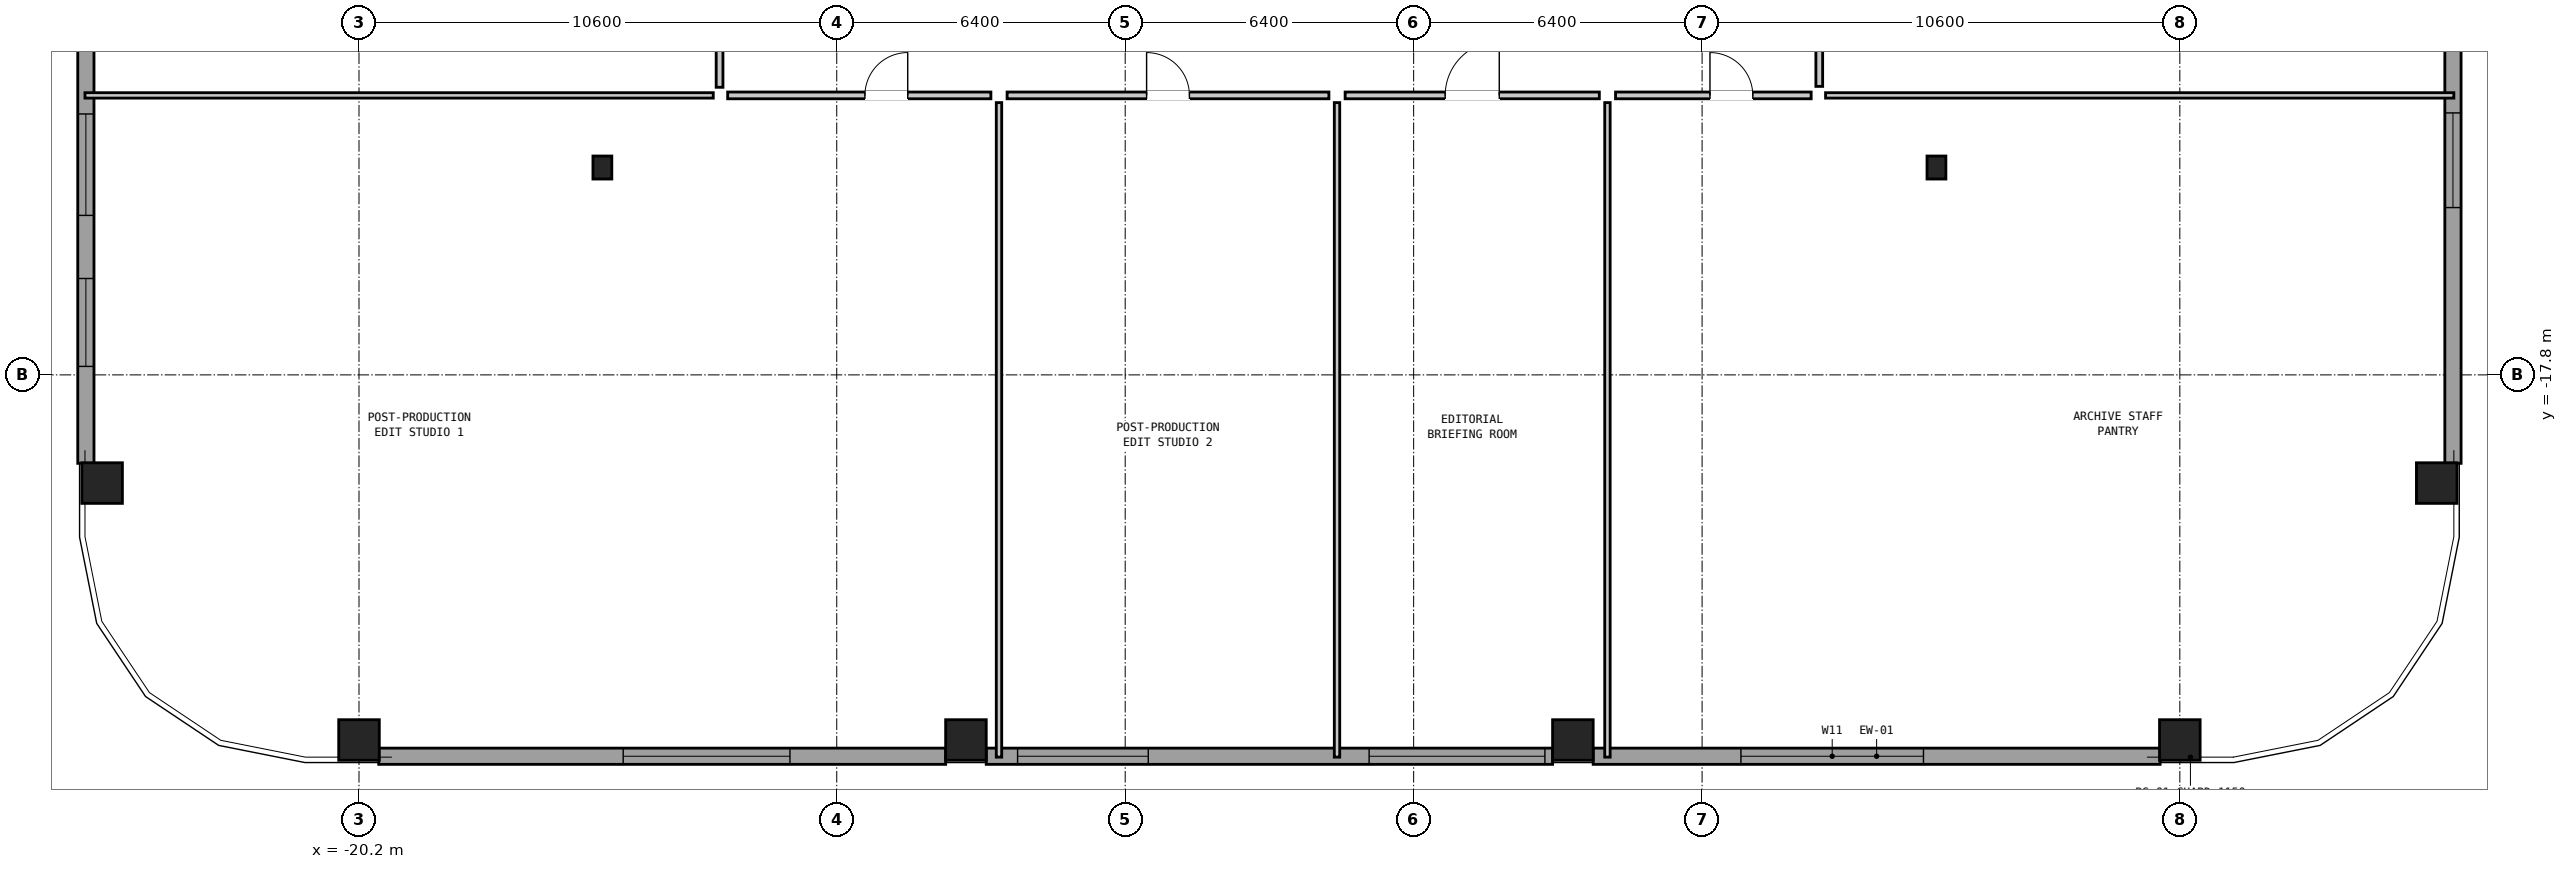
"""IFC4 building model, lengths in metres.
Left out: names, types, materials, properties, quantities, classifications, styles, units other than length and angle.
Written with IfcOpenShell. Run it as: python <this file> out.ifc"""

import sys

from ifc_helpers import new_model, si_unit, direction, frame, frame_2d, origin, origin_2d, place, context, subcontext, project, spatial, rectangle, hollow_rectangle, i_section, extrude, element, fill, save


model = new_model("IFC4")
c1 = context("Model", 3, precision=1e-05, world=origin(), true_north=direction((0.0, 1.0)))
c2 = subcontext(c1, "Body", "Model", "MODEL_VIEW")
j1 = project(units=[si_unit("LENGTHUNIT", "METRE"), si_unit("PLANEANGLEUNIT", "RADIAN")], contexts=[c1])
p1 = place(None, origin())
s1 = spatial("IfcSite", under=j1, at=p1, CompositionType="ELEMENT")
p2 = place(p1, origin())
s2 = spatial("IfcBuilding", under=s1, at=p2, CompositionType="ELEMENT")
p3 = place(p2, frame((0.0, 0.0, 44.4)))
s3 = spatial("IfcBuildingStorey", under=s2, at=p3, CompositionType="ELEMENT", Elevation=44.4)
for number, where, z_axis, x_axis in (
    (1, (-20.2, -25.9, 0.0), (0.0, 0.0, 1.0), (1.0, 0.0, 0.0)),
    (2, (-6.733, -25.9, 0.0), (0.0, 0.0, 1.0), (1.0, 0.0, 0.0)),
    (3, (6.733, -25.9, 0.0), (0.0, 0.0, 1.0), (1.0, 0.0, 0.0)),
    (4, (20.2, -25.9, 0.0), (0.0, 0.0, 1.0), (1.0, 0.0, 0.0)),
    (5, (25.9, -20.2, 0.0), (0.0, 0.0, 1.0), (0.0, 1.0, 0.0)),
    (6, (-25.9, -20.2, 0.0), (0.0, 0.0, 1.0), (0.0, 1.0, 0.0)),
):
    element("IfcColumn", number, at=place(p3, frame(where, z_axis=z_axis, x_axis=x_axis)), inside=s3, PredefinedType="COLUMN", context=c2, shape_type="SweptSolid", body=[
        extrude(hollow_rectangle(XDim=0.9, YDim=0.9, WallThickness=0.055, at=origin_2d()), origin(), (0.0, 0.0, 1.0), 3.05),
    ])
for number, where, z_axis, x_axis in (
    (7, (-14.8, -13.2, 0.0), (0.0, 0.0, 1.0), (1.0, 0.0, 0.0)),
    (8, (14.8, -13.2, 0.0), (0.0, 0.0, 1.0), (1.0, 0.0, 0.0)),
):
    element("IfcColumn", number, at=place(p3, frame(where, z_axis=z_axis, x_axis=x_axis)), inside=s3, PredefinedType="COLUMN", context=c2, shape_type="SweptSolid", body=[
        extrude(i_section(OverallWidth=0.418, OverallDepth=0.51, WebThickness=0.042, FlangeThickness=0.068, at=origin_2d()), origin(), (0.0, 0.0, 1.0), 3.05),
    ])
p4 = place(p3, frame((19.762, -26.26, 0.0), z_axis=(0.0, 0.0, 1.0), x_axis=(-1.0, 0.0, 0.0)))
e9 = element("IfcWall", 9, at=p4, inside=s3, PredefinedType="SOLIDWALL", context=c2, shape_type="SweptSolid", body=[
    extrude(rectangle(XDim=12.579, YDim=0.36, at=frame_2d((6.289, 0.0))), origin(), (0.0, 0.0, 1.0), 2.067),
])
p5 = place(p4, frame((5.25, 0.0, 0.2)))
e10 = element("IfcOpeningElement", 10, at=p5, cuts=e9, PredefinedType="OPENING", context=c2, shape_type="SweptSolid", body=[
    extrude(rectangle(XDim=4.05, YDim=1.0, at=frame_2d((2.025, 0.5))), frame((0.0, 0.192, 0.0), z_axis=(0.0, -1.0, 0.0), x_axis=(1.0, 0.0, 0.0)), (0.0, 0.0, 1.0), 0.384),
])
p6 = place(p3, frame((6.283, -26.26, 0.0), z_axis=(0.0, 0.0, 1.0), x_axis=(-1.0, 0.0, 0.0)))
e11 = element("IfcWall", 11, at=p6, inside=s3, PredefinedType="SOLIDWALL", context=c2, shape_type="SweptSolid", body=[
    extrude(rectangle(XDim=12.566, YDim=0.36, at=frame_2d((6.283, 0.0))), origin(), (0.0, 0.0, 1.0), 2.067),
])
p7 = place(p6, frame((0.171, 0.0, 0.2)))
e12 = element("IfcOpeningElement", 12, at=p7, cuts=e11, PredefinedType="OPENING", context=c2, shape_type="SweptSolid", body=[
    extrude(rectangle(XDim=3.9, YDim=1.05, at=frame_2d((1.95, 0.525))), frame((0.0, 0.192, 0.0), z_axis=(0.0, -1.0, 0.0), x_axis=(1.0, 0.0, 0.0)), (0.0, 0.0, 1.0), 0.384),
])
p8 = place(p6, frame((8.971, 0.0, 0.2)))
e13 = element("IfcOpeningElement", 13, at=p8, cuts=e11, PredefinedType="OPENING", context=c2, shape_type="SweptSolid", body=[
    extrude(rectangle(XDim=2.9, YDim=1.3, at=frame_2d((1.45, 0.65))), frame((0.0, 0.192, 0.0), z_axis=(0.0, -1.0, 0.0), x_axis=(1.0, 0.0, 0.0)), (0.0, 0.0, 1.0), 0.384),
])
p9 = place(p3, frame((-7.183, -26.26, 0.0), z_axis=(0.0, 0.0, 1.0), x_axis=(-1.0, 0.0, 0.0)))
e14 = element("IfcWall", 14, at=p9, inside=s3, PredefinedType="SOLIDWALL", context=c2, shape_type="SweptSolid", body=[
    extrude(rectangle(XDim=12.579, YDim=0.36, at=frame_2d((6.289, 0.0))), origin(), (0.0, 0.0, 1.0), 2.067),
])
p10 = place(p9, frame((3.455, 0.0, 0.2)))
e15 = element("IfcOpeningElement", 15, at=p10, cuts=e14, PredefinedType="OPENING", context=c2, shape_type="SweptSolid", body=[
    extrude(rectangle(XDim=3.7, YDim=1.1, at=frame_2d((1.85, 0.55))), frame((0.0, 0.192, 0.0), z_axis=(0.0, -1.0, 0.0), x_axis=(1.0, 0.0, 0.0)), (0.0, 0.0, 1.0), 0.384),
])
p11 = place(p3, frame((26.26, -7.183, 0.0), z_axis=(0.0, 0.0, 1.0), x_axis=(0.0, -1.0, 0.0)))
e16 = element("IfcWall", 16, at=p11, inside=s3, PredefinedType="SOLIDWALL", context=c2, shape_type="SweptSolid", body=[
    extrude(rectangle(XDim=12.579, YDim=0.36, at=frame_2d((6.289, 0.0))), origin(), (0.0, 0.0, 1.0), 2.067),
])
p12 = place(p11, frame((0.155, 0.0, 1.2)))
e17 = element("IfcOpeningElement", 17, at=p12, cuts=e16, PredefinedType="OPENING", context=c2, shape_type="SweptSolid", body=[
    extrude(rectangle(XDim=1.95, YDim=0.7, at=frame_2d((0.975, 0.35))), frame((0.0, 0.192, 0.0), z_axis=(0.0, -1.0, 0.0), x_axis=(1.0, 0.0, 0.0)), (0.0, 0.0, 1.0), 0.384),
])
p13 = place(p11, frame((4.805, 0.0, 0.2)))
e18 = element("IfcOpeningElement", 18, at=p13, cuts=e16, PredefinedType="OPENING", context=c2, shape_type="SweptSolid", body=[
    extrude(rectangle(XDim=2.1, YDim=1.3, at=frame_2d((1.05, 0.65))), frame((0.0, 0.192, 0.0), z_axis=(0.0, -1.0, 0.0), x_axis=(1.0, 0.0, 0.0)), (0.0, 0.0, 1.0), 0.384),
])
p14 = place(p3, frame((-26.26, -19.762, 0.0), z_axis=(0.0, 0.0, 1.0), x_axis=(0.0, 1.0, 0.0)))
e19 = element("IfcWall", 19, at=p14, inside=s3, PredefinedType="SOLIDWALL", context=c2, shape_type="SweptSolid", body=[
    extrude(rectangle(XDim=12.579, YDim=0.36, at=frame_2d((6.289, 0.0))), origin(), (0.0, 0.0, 1.0), 2.067),
])
p15 = place(p14, frame((2.15, 0.0, 1.2)))
e20 = element("IfcOpeningElement", 20, at=p15, cuts=e19, PredefinedType="OPENING", context=c2, shape_type="SweptSolid", body=[
    extrude(rectangle(XDim=1.95, YDim=0.7, at=frame_2d((0.975, 0.35))), frame((0.0, 0.192, 0.0), z_axis=(0.0, -1.0, 0.0), x_axis=(1.0, 0.0, 0.0)), (0.0, 0.0, 1.0), 0.384),
])
p16 = place(p14, frame((5.5, 0.0, 0.2)))
e21 = element("IfcOpeningElement", 21, at=p16, cuts=e19, PredefinedType="OPENING", context=c2, shape_type="SweptSolid", body=[
    extrude(rectangle(XDim=2.25, YDim=1.2, at=frame_2d((1.125, 0.6))), frame((0.0, 0.192, 0.0), z_axis=(0.0, -1.0, 0.0), x_axis=(1.0, 0.0, 0.0)), (0.0, 0.0, 1.0), 0.384),
])
for number, where, z_axis, x_axis in (
    (22, (-26.28, -11.6, 0.0), (0.0, 0.0, 1.0), (1.0, 0.0, 0.0)),
    (23, (12.34, -11.6, 0.0), (0.0, 0.0, 1.0), (1.0, 0.0, 0.0)),
):
    element("IfcWall", number, at=place(p3, frame(where, z_axis=z_axis, x_axis=x_axis)), inside=s3, PredefinedType="PARTITIONING", context=c2, shape_type="SweptSolid", body=[
        extrude(rectangle(XDim=13.94, YDim=0.12, at=frame_2d((6.97, 0.0))), origin(), (0.0, 0.0, 1.0), 2.274),
    ])
p17 = place(p3, frame((-6.0, -26.28, 0.0), z_axis=(0.0, 0.0, 1.0), x_axis=(0.0, 1.0, 0.0)))
e24 = element("IfcWall", 24, at=p17, inside=s3, PredefinedType="PARTITIONING", context=c2, shape_type="SweptSolid", body=[
    extrude(rectangle(XDim=14.52, YDim=0.12, at=frame_2d((7.26, 0.0))), origin(), (0.0, 0.0, 1.0), 2.274),
])
for number, where, z_axis, x_axis in (
    (25, (1.5, -26.28, 0.0), (0.0, 0.0, 1.0), (0.0, 1.0, 0.0)),
    (26, (7.5, -26.28, 0.0), (0.0, 0.0, 1.0), (0.0, 1.0, 0.0)),
):
    element("IfcWall", number, at=place(p3, frame(where, z_axis=z_axis, x_axis=x_axis)), inside=s3, PredefinedType="PARTITIONING", context=c2, shape_type="SweptSolid", body=[
        extrude(rectangle(XDim=14.52, YDim=0.12, at=frame_2d((7.26, 0.0))), origin(), (0.0, 0.0, 1.0), 2.83),
    ])
p18 = place(p3, frame((-12.02, -11.6, 0.0), z_axis=(0.0, 0.0, 1.0), x_axis=(1.0, 0.0, 0.0)))
e27 = element("IfcWall", 27, at=p18, inside=s3, PredefinedType="PARTITIONING", context=c2, shape_type="SweptSolid", body=[
    extrude(rectangle(XDim=5.84, YDim=0.15, at=frame_2d((2.92, 0.0))), origin(), (0.0, 0.0, 1.0), 2.274),
])
p19 = place(p18, frame((3.045, 0.0, 0.0)))
e28 = element("IfcOpeningElement", 28, at=p19, cuts=e27, PredefinedType="OPENING", context=c2, shape_type="SweptSolid", body=[
    extrude(rectangle(XDim=0.95, YDim=2.1, at=frame_2d((0.475, 1.05))), frame((0.0, 0.087, 0.0), z_axis=(0.0, -1.0, 0.0), x_axis=(1.0, 0.0, 0.0)), (0.0, 0.0, 1.0), 0.174),
])
p20 = place(p3, frame((-5.82, -11.6, 0.0), z_axis=(0.0, 0.0, 1.0), x_axis=(1.0, 0.0, 0.0)))
e29 = element("IfcWall", 29, at=p20, inside=s3, PredefinedType="PARTITIONING", context=c2, shape_type="SweptSolid", body=[
    extrude(rectangle(XDim=7.14, YDim=0.15, at=frame_2d((3.57, 0.0))), origin(), (0.0, 0.0, 1.0), 2.83),
])
p21 = place(p20, frame((3.095, 0.0, 0.0)))
e30 = element("IfcOpeningElement", 30, at=p21, cuts=e29, PredefinedType="OPENING", context=c2, shape_type="SweptSolid", body=[
    extrude(rectangle(XDim=0.95, YDim=2.1, at=frame_2d((0.475, 1.05))), frame((0.0, 0.087, 0.0), z_axis=(0.0, -1.0, 0.0), x_axis=(1.0, 0.0, 0.0)), (0.0, 0.0, 1.0), 0.174),
])
p22 = place(p3, frame((1.68, -11.6, 0.0), z_axis=(0.0, 0.0, 1.0), x_axis=(1.0, 0.0, 0.0)))
e31 = element("IfcWall", 31, at=p22, inside=s3, PredefinedType="PARTITIONING", context=c2, shape_type="SweptSolid", body=[
    extrude(rectangle(XDim=5.64, YDim=0.15, at=frame_2d((2.82, 0.0))), origin(), (0.0, 0.0, 1.0), 2.83),
])
p23 = place(p22, frame((2.22, 0.0, 0.0)))
e32 = element("IfcOpeningElement", 32, at=p23, cuts=e31, PredefinedType="OPENING", context=c2, shape_type="SweptSolid", body=[
    extrude(rectangle(XDim=1.2, YDim=2.1, at=frame_2d((0.6, 1.05))), frame((0.0, 0.087, 0.0), z_axis=(0.0, -1.0, 0.0), x_axis=(1.0, 0.0, 0.0)), (0.0, 0.0, 1.0), 0.174),
])
p24 = place(p3, frame((7.68, -11.6, 0.0), z_axis=(0.0, 0.0, 1.0), x_axis=(1.0, 0.0, 0.0)))
e33 = element("IfcWall", 33, at=p24, inside=s3, PredefinedType="PARTITIONING", context=c2, shape_type="SweptSolid", body=[
    extrude(rectangle(XDim=4.34, YDim=0.15, at=frame_2d((2.17, 0.0))), origin(), (0.0, 0.0, 1.0), 2.274),
])
p25 = place(p24, frame((2.095, 0.0, 0.0)))
e34 = element("IfcOpeningElement", 34, at=p25, cuts=e33, PredefinedType="OPENING", context=c2, shape_type="SweptSolid", body=[
    extrude(rectangle(XDim=0.95, YDim=2.1, at=frame_2d((0.475, 1.05))), frame((0.0, 0.087, 0.0), z_axis=(0.0, -1.0, 0.0), x_axis=(1.0, 0.0, 0.0)), (0.0, 0.0, 1.0), 0.174),
])
p26 = place(p3, frame((-12.2, -11.42, 0.0), z_axis=(0.0, 0.0, 1.0), x_axis=(0.0, 1.0, 0.0)))
e35 = element("IfcWall", 35, at=p26, inside=s3, PredefinedType="PARTITIONING", context=c2, shape_type="SweptSolid", body=[
    extrude(rectangle(XDim=8.24, YDim=0.15, at=frame_2d((4.12, 0.0))), origin(), (0.0, 0.0, 1.0), 2.83),
])
p27 = place(p26, frame((3.645, 0.0, 0.0)))
e36 = element("IfcOpeningElement", 36, at=p27, cuts=e35, PredefinedType="OPENING", context=c2, shape_type="SweptSolid", body=[
    extrude(rectangle(XDim=0.95, YDim=2.1, at=frame_2d((0.475, 1.05))), frame((0.0, 0.087, 0.0), z_axis=(0.0, -1.0, 0.0), x_axis=(1.0, 0.0, 0.0)), (0.0, 0.0, 1.0), 0.174),
])
p28 = place(p3, frame((12.2, -11.4, 0.0), z_axis=(0.0, 0.0, 1.0), x_axis=(0.0, 1.0, 0.0)))
e37 = element("IfcWall", 37, at=p28, inside=s3, PredefinedType="PARTITIONING", context=c2, shape_type="SweptSolid", body=[
    extrude(rectangle(XDim=8.84, YDim=0.15, at=frame_2d((4.42, 0.0))), origin(), (0.0, 0.0, 1.0), 2.83),
])
p29 = place(p28, frame((3.945, 0.0, 0.0)))
e38 = element("IfcOpeningElement", 38, at=p29, cuts=e37, PredefinedType="OPENING", context=c2, shape_type="SweptSolid", body=[
    extrude(rectangle(XDim=0.95, YDim=2.1, at=frame_2d((0.475, 1.05))), frame((0.0, 0.087, 0.0), z_axis=(0.0, -1.0, 0.0), x_axis=(1.0, 0.0, 0.0)), (0.0, 0.0, 1.0), 0.174),
])
p30 = place(p5, origin())
e39 = element("IfcWindow", 39, at=p30, inside=s3, PartitioningType="SINGLE_PANEL", PredefinedType="WINDOW", context=c2, shape_type="SweptSolid", body=[
    extrude(rectangle(XDim=4.05, YDim=1.0, at=frame_2d((2.025, 0.5))), frame((0.0, 0.03, 0.0), z_axis=(0.0, -1.0, 0.0), x_axis=(1.0, 0.0, 0.0)), (0.0, 0.0, 1.0), 0.06),
])
fill(e10, e39)
p31 = place(p7, origin())
e40 = element("IfcWindow", 40, at=p31, inside=s3, PartitioningType="SINGLE_PANEL", PredefinedType="WINDOW", context=c2, shape_type="SweptSolid", body=[
    extrude(rectangle(XDim=3.9, YDim=1.05, at=frame_2d((1.95, 0.525))), frame((0.0, 0.03, 0.0), z_axis=(0.0, -1.0, 0.0), x_axis=(1.0, 0.0, 0.0)), (0.0, 0.0, 1.0), 0.06),
])
fill(e12, e40)
p32 = place(p8, origin())
e41 = element("IfcWindow", 41, at=p32, inside=s3, PartitioningType="SINGLE_PANEL", PredefinedType="WINDOW", context=c2, shape_type="SweptSolid", body=[
    extrude(rectangle(XDim=2.9, YDim=1.3, at=frame_2d((1.45, 0.65))), frame((0.0, 0.03, 0.0), z_axis=(0.0, -1.0, 0.0), x_axis=(1.0, 0.0, 0.0)), (0.0, 0.0, 1.0), 0.06),
])
fill(e13, e41)
p33 = place(p10, origin())
e42 = element("IfcWindow", 42, at=p33, inside=s3, PartitioningType="SINGLE_PANEL", PredefinedType="WINDOW", context=c2, shape_type="SweptSolid", body=[
    extrude(rectangle(XDim=3.7, YDim=1.1, at=frame_2d((1.85, 0.55))), frame((0.0, 0.03, 0.0), z_axis=(0.0, -1.0, 0.0), x_axis=(1.0, 0.0, 0.0)), (0.0, 0.0, 1.0), 0.06),
])
fill(e15, e42)
p34 = place(p13, origin())
e43 = element("IfcWindow", 43, at=p34, inside=s3, PartitioningType="SINGLE_PANEL", PredefinedType="WINDOW", context=c2, shape_type="SweptSolid", body=[
    extrude(rectangle(XDim=2.1, YDim=1.3, at=frame_2d((1.05, 0.65))), frame((0.0, 0.03, 0.0), z_axis=(0.0, -1.0, 0.0), x_axis=(1.0, 0.0, 0.0)), (0.0, 0.0, 1.0), 0.06),
])
fill(e18, e43)
p35 = place(p15, origin())
e44 = element("IfcWindow", 44, at=p35, inside=s3, PartitioningType="SINGLE_PANEL", PredefinedType="WINDOW", context=c2, shape_type="SweptSolid", body=[
    extrude(rectangle(XDim=1.95, YDim=0.7, at=frame_2d((0.975, 0.35))), frame((0.0, 0.03, 0.0), z_axis=(0.0, -1.0, 0.0), x_axis=(1.0, 0.0, 0.0)), (0.0, 0.0, 1.0), 0.06),
])
fill(e20, e44)
p36 = place(p16, origin())
e45 = element("IfcWindow", 45, at=p36, inside=s3, PartitioningType="SINGLE_PANEL", PredefinedType="WINDOW", context=c2, shape_type="SweptSolid", body=[
    extrude(rectangle(XDim=2.25, YDim=1.2, at=frame_2d((1.125, 0.6))), frame((0.0, 0.03, 0.0), z_axis=(0.0, -1.0, 0.0), x_axis=(1.0, 0.0, 0.0)), (0.0, 0.0, 1.0), 0.06),
])
fill(e21, e45)
p37 = place(p19, origin())
e46 = element("IfcDoor", 46, at=p37, inside=s3, OperationType="SINGLE_SWING_RIGHT", PredefinedType="DOOR", context=c2, shape_type="SweptSolid", body=[
    extrude(rectangle(XDim=0.95, YDim=2.1, at=frame_2d((0.475, 1.05))), frame((0.0, 0.025, 0.0), z_axis=(0.0, -1.0, 0.0), x_axis=(1.0, 0.0, 0.0)), (0.0, 0.0, 1.0), 0.05),
])
fill(e28, e46)
p38 = place(p21, origin())
e47 = element("IfcDoor", 47, at=p38, inside=s3, OperationType="SINGLE_SWING_LEFT", PredefinedType="DOOR", context=c2, shape_type="SweptSolid", body=[
    extrude(rectangle(XDim=0.95, YDim=2.1, at=frame_2d((0.475, 1.05))), frame((0.0, 0.025, 0.0), z_axis=(0.0, -1.0, 0.0), x_axis=(1.0, 0.0, 0.0)), (0.0, 0.0, 1.0), 0.05),
])
fill(e30, e47)
p39 = place(p23, origin())
e48 = element("IfcDoor", 48, at=p39, inside=s3, OperationType="SINGLE_SWING_RIGHT", PredefinedType="DOOR", context=c2, shape_type="SweptSolid", body=[
    extrude(rectangle(XDim=1.2, YDim=2.1, at=frame_2d((0.6, 1.05))), frame((0.0, 0.025, 0.0), z_axis=(0.0, -1.0, 0.0), x_axis=(1.0, 0.0, 0.0)), (0.0, 0.0, 1.0), 0.05),
])
fill(e32, e48)
p40 = place(p25, origin())
e49 = element("IfcDoor", 49, at=p40, inside=s3, OperationType="SINGLE_SWING_LEFT", PredefinedType="DOOR", context=c2, shape_type="SweptSolid", body=[
    extrude(rectangle(XDim=0.95, YDim=2.1, at=frame_2d((0.475, 1.05))), frame((0.0, 0.025, 0.0), z_axis=(0.0, -1.0, 0.0), x_axis=(1.0, 0.0, 0.0)), (0.0, 0.0, 1.0), 0.05),
])
fill(e34, e49)
save(model, sys.argv[1])
